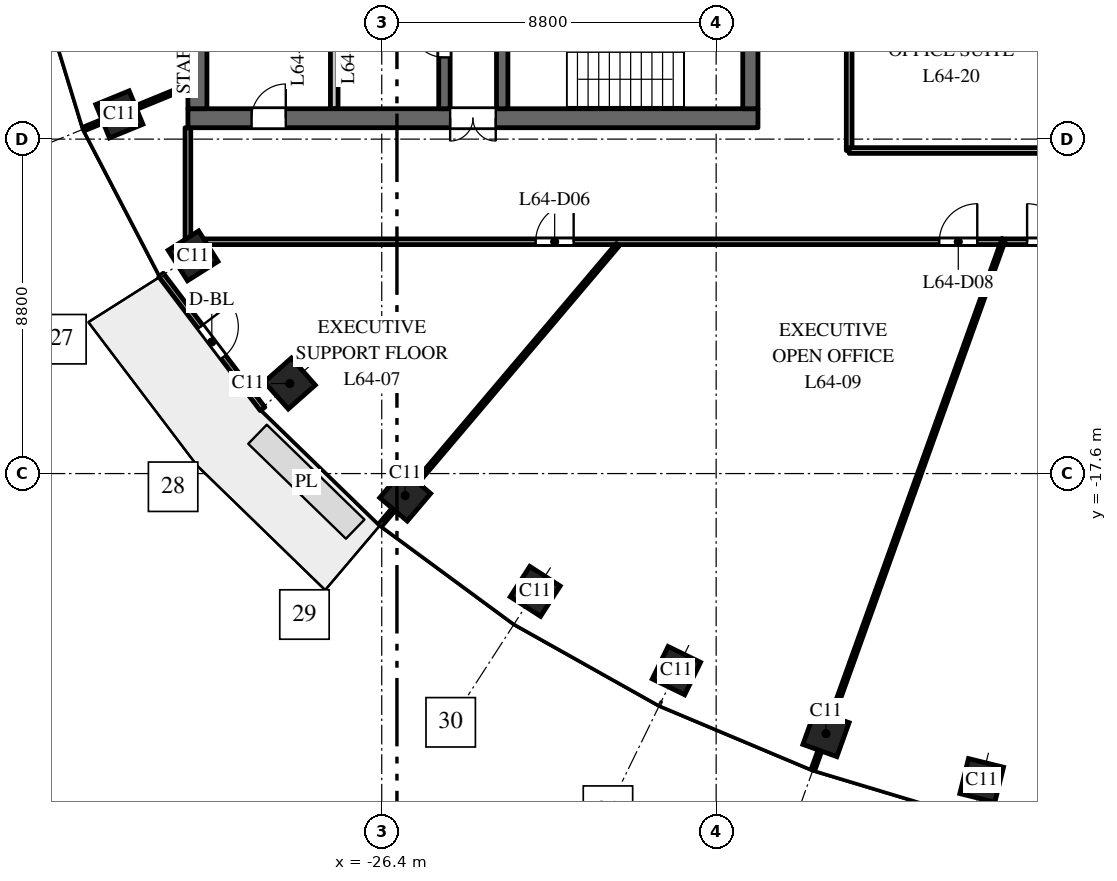
"""IFC4 building model, lengths in metres.
Left out: names, types, materials, properties, quantities, classifications, styles, units other than length and angle.
Written with IfcOpenShell. Run it as: python <this file> out.ifc"""

import sys

from ifc_helpers import new_model, si_unit, direction, frame, frame_2d, origin, origin_2d, place, context, subcontext, project, spatial, rectangle, extrude, element, fill, save


model = new_model("IFC4")
c1 = context("Model", 3, precision=1e-05, world=origin(), true_north=direction((0.0, 1.0)))
c2 = subcontext(c1, "Body", "Model", "MODEL_VIEW")
j1 = project(units=[si_unit("LENGTHUNIT", "METRE"), si_unit("PLANEANGLEUNIT", "RADIAN")], contexts=[c1])
p1 = place(None, origin())
s1 = spatial("IfcSite", under=j1, at=p1, CompositionType="ELEMENT")
p2 = place(p1, origin())
s2 = spatial("IfcBuilding", under=s1, at=p2, CompositionType="ELEMENT")
p3 = place(p2, frame((0.0, 0.0, 299.0)))
s3 = spatial("IfcBuildingStorey", under=s2, at=p3, CompositionType="ELEMENT", Elevation=299.0)
for number, where, z_axis, x_axis in (
    (1, (-33.305, -8.149, 0.0), (0.0, 0.0, 1.0), (0.379, -0.925, 0.0)),
    (2, (-31.365, -11.871, 0.0), (0.0, 0.0, 1.0), (0.535, -0.845, 0.0)),
    (3, (-28.819, -15.23, 0.0), (0.0, 0.0, 1.0), (0.663, -0.749, 0.0)),
    (4, (-25.783, -18.18, 0.0), (0.0, 0.0, 1.0), (0.763, -0.646, 0.0)),
    (5, (-22.362, -20.7, 0.0), (0.0, 0.0, 1.0), (0.84, -0.542, 0.0)),
    (6, (-18.646, -22.785, 0.0), (0.0, 0.0, 1.0), (0.898, -0.439, 0.0)),
    (7, (-14.709, -24.441, 0.0), (0.0, 0.0, 1.0), (0.941, -0.338, 0.0)),
    (8, (-10.613, -25.674, 0.0), (0.0, 0.0, 1.0), (0.971, -0.24, 0.0)),
):
    element("IfcColumn", number, at=place(p3, frame(where, z_axis=z_axis, x_axis=x_axis)), inside=s3, PredefinedType="COLUMN", context=c2, shape_type="SweptSolid", body=[
        extrude(rectangle(XDim=0.95, YDim=0.95, at=origin_2d()), origin(), (0.0, 0.0, 1.0), 4.0),
    ])
p4 = place(p3, frame((-16.5, -8.25, 0.0), z_axis=(0.0, 0.0, 1.0), x_axis=(-1.0, 0.0, 0.0)))
e9 = element("IfcWall", 9, at=p4, inside=s3, PredefinedType="SHEAR", context=c2, shape_type="SweptSolid", body=[
    extrude(rectangle(XDim=15.0, YDim=0.5, at=frame_2d((7.5, 0.0))), origin(), (0.0, 0.0, 1.0), 3.7),
])
p5 = place(p4, frame((6.9, 0.0, 0.0)))
e10 = element("IfcOpeningElement", 10, at=p5, cuts=e9, PredefinedType="OPENING", context=c2, shape_type="SweptSolid", body=[
    extrude(rectangle(XDim=1.2, YDim=2.1, at=frame_2d((0.6, 1.05))), frame((0.0, 0.26, 0.0), z_axis=(0.0, -1.0, 0.0), x_axis=(1.0, 0.0, 0.0)), (0.0, 0.0, 1.0), 0.52),
])
p6 = place(p4, frame((12.425, 0.0, 0.0)))
e11 = element("IfcOpeningElement", 11, at=p6, cuts=e9, PredefinedType="OPENING", context=c2, shape_type="SweptSolid", body=[
    extrude(rectangle(XDim=0.9, YDim=2.1, at=frame_2d((0.45, 1.05))), frame((0.0, 0.26, 0.0), z_axis=(0.0, -1.0, 0.0), x_axis=(1.0, 0.0, 0.0)), (0.0, 0.0, 1.0), 0.52),
])
p7 = place(p3, frame((-24.75, -8.0, 0.0), z_axis=(0.0, 0.0, 1.0), x_axis=(0.0, 1.0, 0.0)))
e12 = element("IfcWall", 12, at=p7, inside=s3, PredefinedType="SHEAR", context=c2, shape_type="SweptSolid", body=[
    extrude(rectangle(XDim=16.0, YDim=0.3, at=frame_2d((8.0, 0.0))), origin(), (0.0, 0.0, 1.0), 3.7),
])
p8 = place(p7, frame((4.425, 0.0, 0.0)))
e13 = element("IfcOpeningElement", 13, at=p8, cuts=e12, PredefinedType="OPENING", context=c2, shape_type="SweptSolid", body=[
    extrude(rectangle(XDim=1.1, YDim=2.1, at=frame_2d((0.55, 1.05))), frame((0.0, 0.16, 0.0), z_axis=(0.0, -1.0, 0.0), x_axis=(1.0, 0.0, 0.0)), (0.0, 0.0, 1.0), 0.32),
])
p9 = place(p7, frame((7.45, 0.0, 0.0)))
e14 = element("IfcOpeningElement", 14, at=p9, cuts=e12, PredefinedType="OPENING", context=c2, shape_type="SweptSolid", body=[
    extrude(rectangle(XDim=1.1, YDim=2.1, at=frame_2d((0.55, 1.05))), frame((0.0, 0.16, 0.0), z_axis=(0.0, -1.0, 0.0), x_axis=(1.0, 0.0, 0.0)), (0.0, 0.0, 1.0), 0.32),
])
p10 = place(p7, frame((10.575, 0.0, 0.0)))
e15 = element("IfcOpeningElement", 15, at=p10, cuts=e12, PredefinedType="OPENING", context=c2, shape_type="SweptSolid", body=[
    extrude(rectangle(XDim=0.9, YDim=2.1, at=frame_2d((0.45, 1.05))), frame((0.0, 0.16, 0.0), z_axis=(0.0, -1.0, 0.0), x_axis=(1.0, 0.0, 0.0)), (0.0, 0.0, 1.0), 0.32),
])
p11 = place(p7, frame((13.125, 0.0, 0.0)))
e16 = element("IfcOpeningElement", 16, at=p11, cuts=e12, PredefinedType="OPENING", context=c2, shape_type="SweptSolid", body=[
    extrude(rectangle(XDim=0.9, YDim=2.1, at=frame_2d((0.45, 1.05))), frame((0.0, 0.16, 0.0), z_axis=(0.0, -1.0, 0.0), x_axis=(1.0, 0.0, 0.0)), (0.0, 0.0, 1.0), 0.32),
])
p12 = place(p7, frame((14.75, 0.0, 0.0)))
e17 = element("IfcOpeningElement", 17, at=p12, cuts=e12, PredefinedType="OPENING", context=c2, shape_type="SweptSolid", body=[
    extrude(rectangle(XDim=0.9, YDim=2.1, at=frame_2d((0.45, 1.05))), frame((0.0, 0.16, 0.0), z_axis=(0.0, -1.0, 0.0), x_axis=(1.0, 0.0, 0.0)), (0.0, 0.0, 1.0), 0.32),
])
p13 = place(p7, frame((1.35, 0.0, 0.0)))
e18 = element("IfcOpeningElement", 18, at=p13, cuts=e12, PredefinedType="OPENING", context=c2, shape_type="SweptSolid", body=[
    extrude(rectangle(XDim=0.9, YDim=2.1, at=frame_2d((0.45, 1.05))), frame((0.0, 0.16, 0.0), z_axis=(0.0, -1.0, 0.0), x_axis=(1.0, 0.0, 0.0)), (0.0, 0.0, 1.0), 0.32),
])
p14 = place(p3, frame((-16.7, -8.0, 0.0), z_axis=(0.0, 0.0, 1.0), x_axis=(0.0, 1.0, 0.0)))
e19 = element("IfcWall", 19, at=p14, inside=s3, PredefinedType="SHEAR", context=c2, shape_type="SweptSolid", body=[
    extrude(rectangle(XDim=16.0, YDim=0.4, at=frame_2d((8.0, 0.0))), origin(), (0.0, 0.0, 1.0), 3.7),
])
p15 = place(p3, frame((-31.25, -8.0, 0.0), z_axis=(0.0, 0.0, 1.0), x_axis=(0.0, 1.0, 0.0)))
e20 = element("IfcWall", 20, at=p15, inside=s3, PredefinedType="SHEAR", context=c2, shape_type="SweptSolid", body=[
    extrude(rectangle(XDim=16.0, YDim=0.5, at=frame_2d((8.0, 0.0))), origin(), (0.0, 0.0, 1.0), 3.7),
])
p16 = place(p3, frame((-27.65, -8.0, 0.0), z_axis=(0.0, 0.0, 1.0), x_axis=(0.0, 1.0, 0.0)))
e21 = element("IfcWall", 21, at=p16, inside=s3, PredefinedType="PARTITIONING", context=c2, shape_type="SweptSolid", body=[
    extrude(rectangle(XDim=3.25, YDim=0.2, at=frame_2d((1.625, 0.0))), origin(), (0.0, 0.0, 1.0), 3.7),
])
p17 = place(p3, frame((-23.23, -8.0, 0.0), z_axis=(0.0, 0.0, 1.0), x_axis=(0.0, 1.0, 0.0)))
e22 = element("IfcWall", 22, at=p17, inside=s3, PredefinedType="SHEAR", context=c2, shape_type="SweptSolid", body=[
    extrude(rectangle(XDim=7.875, YDim=0.3, at=frame_2d((3.938, 0.0))), origin(), (0.0, 0.0, 1.0), 3.7),
])
p18 = place(p17, frame((5.15, 0.0, 0.0)))
e23 = element("IfcOpeningElement", 23, at=p18, cuts=e22, PredefinedType="OPENING", context=c2, shape_type="SweptSolid", body=[
    extrude(rectangle(XDim=1.1, YDim=2.1, at=frame_2d((0.55, 1.05))), frame((0.0, 0.16, 0.0), z_axis=(0.0, -1.0, 0.0), x_axis=(1.0, 0.0, 0.0)), (0.0, 0.0, 1.0), 0.32),
])
p19 = place(p3, frame((-32.208, -12.374, 0.0), z_axis=(0.0, 0.0, 1.0), x_axis=(0.604045763106, -0.796949632081, 0.0)))
e24 = element("IfcWall", 24, at=p19, inside=s3, PredefinedType="STANDARD", context=c2, shape_type="SweptSolid", body=[
    extrude(rectangle(XDim=4.423, YDim=0.15, at=frame_2d((2.212, 0.0))), origin(), (0.0, 0.0, 1.0), 3.7),
])
p20 = place(p19, frame((1.712, 0.0, 0.0)))
e25 = element("IfcOpeningElement", 25, at=p20, cuts=e24, PredefinedType="OPENING", context=c2, shape_type="SweptSolid", body=[
    extrude(rectangle(XDim=1.0, YDim=2.4, at=frame_2d((0.5, 1.2))), frame((0.0, 0.085, 0.0), z_axis=(0.0, -1.0, 0.0), x_axis=(1.0, 0.0, 0.0)), (0.0, 0.0, 1.0), 0.17),
])
p21 = place(p3, frame((-34.234, -8.53, 0.0), z_axis=(0.0, 0.0, 1.0), x_axis=(0.925344112436, 0.379128307542, 0.0)))
e26 = element("IfcWall", 26, at=p21, inside=s3, PredefinedType="PARTITIONING", context=c2, shape_type="SweptSolid", body=[
    extrude(rectangle(XDim=2.954, YDim=0.1, at=frame_2d((1.477, 0.0))), origin(), (0.0, 0.0, 1.0), 3.0),
])
p22 = place(p3, frame((-31.5, -11.5, 0.0), z_axis=(0.0, 0.0, 1.0), x_axis=(0.0, 1.0, 0.0)))
e27 = element("IfcWall", 27, at=p22, inside=s3, PredefinedType="PARTITIONING", context=c2, shape_type="SweptSolid", body=[
    extrude(rectangle(XDim=3.0, YDim=0.15, at=frame_2d((1.5, 0.0))), origin(), (0.0, 0.0, 1.0), 3.0),
])
p23 = place(p3, frame((-31.5, -11.5, 0.0), z_axis=(0.0, 0.0, 1.0), x_axis=(1.0, 0.0, 0.0)))
e28 = element("IfcWall", 28, at=p23, inside=s3, PredefinedType="PARTITIONING", context=c2, shape_type="SweptSolid", body=[
    extrude(rectangle(XDim=21.432, YDim=0.15, at=frame_2d((10.716, 0.0))), origin(), (0.0, 0.0, 1.0), 2.75),
])
p24 = place(p23, frame((9.15, 0.0, 0.0)))
e29 = element("IfcOpeningElement", 29, at=p24, cuts=e28, PredefinedType="OPENING", context=c2, shape_type="SweptSolid", body=[
    extrude(rectangle(XDim=1.0, YDim=2.1, at=frame_2d((0.5, 1.05))), frame((0.0, 0.085, 0.0), z_axis=(0.0, -1.0, 0.0), x_axis=(1.0, 0.0, 0.0)), (0.0, 0.0, 1.0), 0.17),
])
p25 = place(p23, frame((19.771, 0.0, 0.0)))
e30 = element("IfcOpeningElement", 30, at=p25, cuts=e28, PredefinedType="OPENING", context=c2, shape_type="SweptSolid", body=[
    extrude(rectangle(XDim=1.0, YDim=2.1, at=frame_2d((0.5, 1.05))), frame((0.0, 0.085, 0.0), z_axis=(0.0, -1.0, 0.0), x_axis=(1.0, 0.0, 0.0)), (0.0, 0.0, 1.0), 0.17),
])
p26 = place(p3, frame((-26.43, -18.945, 0.0), z_axis=(0.0, 0.0, 1.0), x_axis=(0.646376264927, 0.763018822926, 0.0)))
e31 = element("IfcWall", 31, at=p26, inside=s3, PredefinedType="PARTITIONING", context=c2, shape_type="SweptSolid", body=[
    extrude(rectangle(XDim=9.655, YDim=0.1, at=frame_2d((4.828, 0.0))), origin(), (0.0, 0.0, 1.0), 2.75),
])
p27 = place(p3, frame((-15.048, -25.383, 0.0), z_axis=(0.0, 0.0, 1.0), x_axis=(0.338396469125, 0.941003628943, 0.0)))
e32 = element("IfcWall", 32, at=p27, inside=s3, PredefinedType="PARTITIONING", context=c2, shape_type="SweptSolid", body=[
    extrude(rectangle(XDim=14.829, YDim=0.1, at=frame_2d((7.415, 0.0))), origin(), (0.0, 0.0, 1.0), 2.75),
])
p28 = place(p3, frame((-14.1, -9.1, 0.0), z_axis=(0.0, 0.0, 1.0), x_axis=(0.0, 1.0, 0.0)))
e33 = element("IfcWall", 33, at=p28, inside=s3, PredefinedType="PARTITIONING", context=c2, shape_type="SweptSolid", body=[
    extrude(rectangle(XDim=5.005, YDim=0.15, at=frame_2d((2.502, 0.0))), origin(), (0.0, 0.0, 1.0), 3.7),
])
p29 = place(p3, frame((-14.1, -9.1, 0.0), z_axis=(0.0, 0.0, 1.0), x_axis=(1.0, 0.0, 0.0)))
e34 = element("IfcWall", 34, at=p29, inside=s3, PredefinedType="PARTITIONING", context=c2, shape_type="SweptSolid", body=[
    extrude(rectangle(XDim=12.3, YDim=0.15, at=frame_2d((6.15, 0.0))), origin(), (0.0, 0.0, 1.0), 2.75),
])
p30 = place(p29, frame((8.4, 0.0, 0.0)))
e35 = element("IfcOpeningElement", 35, at=p30, cuts=e34, PredefinedType="OPENING", context=c2, shape_type="SweptSolid", body=[
    extrude(rectangle(XDim=1.0, YDim=2.1, at=frame_2d((0.5, 1.05))), frame((0.0, 0.085, 0.0), z_axis=(0.0, -1.0, 0.0), x_axis=(1.0, 0.0, 0.0)), (0.0, 0.0, 1.0), 0.17),
])
p31 = place(p3, frame((-10.003, -11.5, 0.0), z_axis=(0.0, 0.0, 1.0), x_axis=(1.0, 0.0, 0.0)))
e36 = element("IfcWall", 36, at=p31, inside=s3, PredefinedType="PARTITIONING", context=c2, shape_type="SweptSolid", body=[
    extrude(rectangle(XDim=8.518, YDim=0.15, at=frame_2d((4.259, 0.0))), origin(), (0.0, 0.0, 1.0), 2.75),
])
p32 = place(p31, frame((0.585, 0.0, 0.0)))
e37 = element("IfcOpeningElement", 37, at=p32, cuts=e36, PredefinedType="OPENING", context=c2, shape_type="SweptSolid", body=[
    extrude(rectangle(XDim=1.0, YDim=2.1, at=frame_2d((0.5, 1.05))), frame((0.0, 0.085, 0.0), z_axis=(0.0, -1.0, 0.0), x_axis=(1.0, 0.0, 0.0)), (0.0, 0.0, 1.0), 0.17),
])
p33 = place(p5, origin())
e38 = element("IfcDoor", 38, at=p33, inside=s3, OperationType="DOUBLE_DOOR_DOUBLE_SWING", PredefinedType="DOOR", context=c2, shape_type="SweptSolid", body=[
    extrude(rectangle(XDim=1.2, YDim=2.1, at=frame_2d((0.6, 1.05))), frame((0.0, 0.025, 0.0), z_axis=(0.0, -1.0, 0.0), x_axis=(1.0, 0.0, 0.0)), (0.0, 0.0, 1.0), 0.05),
])
fill(e10, e38)
p34 = place(p13, origin())
e39 = element("IfcDoor", 39, at=p34, inside=s3, OperationType="SINGLE_SWING_LEFT", PredefinedType="DOOR", context=c2, shape_type="SweptSolid", body=[
    extrude(rectangle(XDim=0.9, YDim=2.1, at=frame_2d((0.45, 1.05))), frame((0.0, 0.025, 0.0), z_axis=(0.0, -1.0, 0.0), x_axis=(1.0, 0.0, 0.0)), (0.0, 0.0, 1.0), 0.05),
])
fill(e18, e39)
p35 = place(p6, origin())
e40 = element("IfcDoor", 40, at=p35, inside=s3, OperationType="SINGLE_SWING_LEFT", PredefinedType="DOOR", context=c2, shape_type="SweptSolid", body=[
    extrude(rectangle(XDim=0.9, YDim=2.1, at=frame_2d((0.45, 1.05))), frame((0.0, 0.025, 0.0), z_axis=(0.0, -1.0, 0.0), x_axis=(1.0, 0.0, 0.0)), (0.0, 0.0, 1.0), 0.05),
])
fill(e11, e40)
p36 = place(p20, origin())
e41 = element("IfcDoor", 41, at=p36, inside=s3, OperationType="SINGLE_SWING_LEFT", PredefinedType="DOOR", context=c2, shape_type="SweptSolid", body=[
    extrude(rectangle(XDim=1.0, YDim=2.4, at=frame_2d((0.5, 1.2))), frame((0.0, 0.025, 0.0), z_axis=(0.0, -1.0, 0.0), x_axis=(1.0, 0.0, 0.0)), (0.0, 0.0, 1.0), 0.05),
])
fill(e25, e41)
p37 = place(p24, origin())
e42 = element("IfcDoor", 42, at=p37, inside=s3, OperationType="SINGLE_SWING_RIGHT", PredefinedType="DOOR", context=c2, shape_type="SweptSolid", body=[
    extrude(rectangle(XDim=1.0, YDim=2.1, at=frame_2d((0.5, 1.05))), frame((0.0, 0.025, 0.0), z_axis=(0.0, -1.0, 0.0), x_axis=(1.0, 0.0, 0.0)), (0.0, 0.0, 1.0), 0.05),
])
fill(e29, e42)
p38 = place(p25, origin())
e43 = element("IfcDoor", 43, at=p38, inside=s3, OperationType="SINGLE_SWING_RIGHT", PredefinedType="DOOR", context=c2, shape_type="SweptSolid", body=[
    extrude(rectangle(XDim=1.0, YDim=2.1, at=frame_2d((0.5, 1.05))), frame((0.0, 0.025, 0.0), z_axis=(0.0, -1.0, 0.0), x_axis=(1.0, 0.0, 0.0)), (0.0, 0.0, 1.0), 0.05),
])
fill(e30, e43)
p39 = place(p32, origin())
e44 = element("IfcDoor", 44, at=p39, inside=s3, OperationType="SINGLE_SWING_LEFT", PredefinedType="DOOR", context=c2, shape_type="SweptSolid", body=[
    extrude(rectangle(XDim=1.0, YDim=2.1, at=frame_2d((0.5, 1.05))), frame((0.0, 0.025, 0.0), z_axis=(0.0, -1.0, 0.0), x_axis=(1.0, 0.0, 0.0)), (0.0, 0.0, 1.0), 0.05),
])
fill(e37, e44)
save(model, sys.argv[1])
